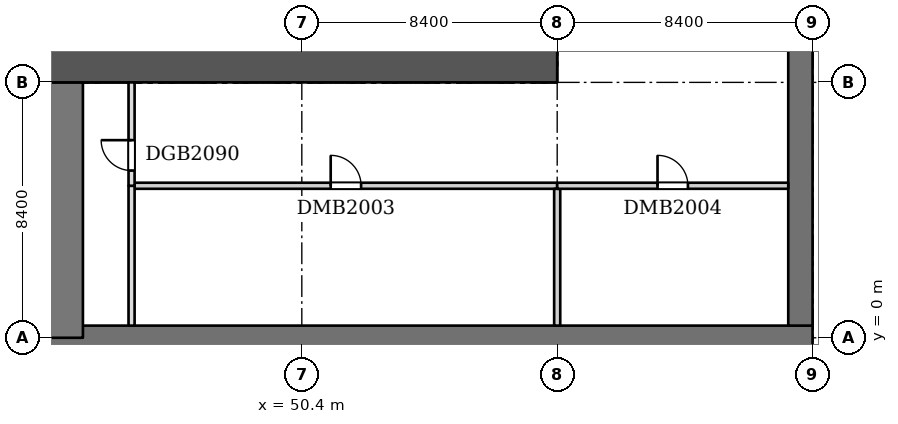
"""IFC4 building model, lengths in metres.
Left out: names, types, materials, properties, quantities, classifications, styles, units other than length and angle.
Written with IfcOpenShell. Run it as: python <this file> out.ifc"""

import sys

from ifc_helpers import new_model, si_unit, direction, frame, frame_2d, origin, place, context, subcontext, project, spatial, rectangle, extrude, element, fill, save


model = new_model("IFC4")
c1 = context("Model", 3, precision=1e-05, world=origin(), true_north=direction((0.0, 1.0)))
c2 = subcontext(c1, "Body", "Model", "MODEL_VIEW")
j1 = project(units=[si_unit("LENGTHUNIT", "METRE"), si_unit("PLANEANGLEUNIT", "RADIAN")], contexts=[c1])
p1 = place(None, origin())
s1 = spatial("IfcSite", under=j1, at=p1, CompositionType="ELEMENT")
p2 = place(p1, origin())
s2 = spatial("IfcBuilding", under=s1, at=p2, CompositionType="ELEMENT")
p3 = place(p2, frame((0.0, 0.0, -8.0)))
s3 = spatial("IfcBuildingStorey", under=s2, at=p3, CompositionType="ELEMENT", Elevation=-8.0)
p4 = place(p3, frame((-8.8, 0.0, 0.0), z_axis=(0.0, 0.0, 1.0), x_axis=(1.0, 0.0, 0.0)))
e1 = element("IfcWall", 1, at=p4, inside=s3, PredefinedType="SOLIDWALL", context=c2, shape_type="SweptSolid", body=[
    extrude(rectangle(XDim=76.0, YDim=0.8, at=frame_2d((38.0, 0.0))), origin(), (0.0, 0.0, 1.0), 3.7),
])
p5 = place(p3, frame((66.8, 0.4, 0.0), z_axis=(0.0, 0.0, 1.0), x_axis=(0.0, 1.0, 0.0)))
e2 = element("IfcWall", 2, at=p5, inside=s3, PredefinedType="SOLIDWALL", context=c2, shape_type="SweptSolid", body=[
    extrude(rectangle(XDim=36.2, YDim=0.8, at=frame_2d((18.1, 0.0))), origin(), (0.0, 0.0, 1.0), 3.7),
])
p6 = place(p3, frame((42.6, 0.0, 0.0), z_axis=(0.0, 0.0, 1.0), x_axis=(0.0, 1.0, 0.0)))
e3 = element("IfcWall", 3, at=p6, inside=s3, PredefinedType="SHEAR", context=c2, shape_type="SweptSolid", body=[
    extrude(rectangle(XDim=8.4, YDim=1.2, at=frame_2d((4.2, 0.0))), origin(), (0.0, 0.0, 1.0), 3.7),
])
p7 = place(p3, frame((42.0, 9.0, 0.0), z_axis=(0.0, 0.0, 1.0), x_axis=(1.0, 0.0, 0.0)))
e4 = element("IfcWall", 4, at=p7, inside=s3, PredefinedType="SHEAR", context=c2, shape_type="SweptSolid", body=[
    extrude(rectangle(XDim=16.8, YDim=1.2, at=frame_2d((8.4, 0.0))), origin(), (0.0, 0.0, 1.0), 3.7),
])
p8 = place(p3, frame((44.9, 5.0, 0.0), z_axis=(0.0, 0.0, 1.0), x_axis=(1.0, 0.0, 0.0)))
e5 = element("IfcWall", 5, at=p8, inside=s3, PredefinedType="PARTITIONING", context=c2, shape_type="SweptSolid", body=[
    extrude(rectangle(XDim=13.9, YDim=0.2, at=frame_2d((6.95, 0.0))), origin(), (0.0, 0.0, 1.0), 3.7),
])
p9 = place(p8, frame((6.45, 0.0, 0.0)))
e6 = element("IfcOpeningElement", 6, at=p9, cuts=e5, PredefinedType="OPENING", context=c2, shape_type="SweptSolid", body=[
    extrude(rectangle(XDim=1.0, YDim=2.1, at=frame_2d((0.5, 1.05))), frame((0.0, 0.11, 0.0), z_axis=(0.0, -1.0, 0.0), x_axis=(1.0, 0.0, 0.0)), (0.0, 0.0, 1.0), 0.22),
])
p10 = place(p3, frame((58.8, 0.4, 0.0), z_axis=(0.0, 0.0, 1.0), x_axis=(0.0, 1.0, 0.0)))
e7 = element("IfcWall", 7, at=p10, inside=s3, PredefinedType="PARTITIONING", context=c2, shape_type="SweptSolid", body=[
    extrude(rectangle(XDim=4.5, YDim=0.2, at=frame_2d((2.25, 0.0))), origin(), (0.0, 0.0, 1.0), 3.7),
])
p11 = place(p3, frame((58.8, 5.0, 0.0), z_axis=(0.0, 0.0, 1.0), x_axis=(1.0, 0.0, 0.0)))
e8 = element("IfcWall", 8, at=p11, inside=s3, PredefinedType="PARTITIONING", context=c2, shape_type="SweptSolid", body=[
    extrude(rectangle(XDim=7.6, YDim=0.2, at=frame_2d((3.8, 0.0))), origin(), (0.0, 0.0, 1.0), 3.7),
])
p12 = place(p11, frame((3.3, 0.0, 0.0)))
e9 = element("IfcOpeningElement", 9, at=p12, cuts=e8, PredefinedType="OPENING", context=c2, shape_type="SweptSolid", body=[
    extrude(rectangle(XDim=1.0, YDim=2.1, at=frame_2d((0.5, 1.05))), frame((0.0, 0.11, 0.0), z_axis=(0.0, -1.0, 0.0), x_axis=(1.0, 0.0, 0.0)), (0.0, 0.0, 1.0), 0.22),
])
p13 = place(p3, frame((44.8, 0.4, 0.0), z_axis=(0.0, 0.0, 1.0), x_axis=(0.0, 1.0, 0.0)))
e10 = element("IfcWall", 10, at=p13, inside=s3, PredefinedType="PARTITIONING", context=c2, shape_type="SweptSolid", body=[
    extrude(rectangle(XDim=4.6, YDim=0.2, at=frame_2d((2.3, 0.0))), origin(), (0.0, 0.0, 1.0), 3.7),
])
p14 = place(p3, frame((44.8, 5.0, 0.0), z_axis=(0.0, 0.0, 1.0), x_axis=(0.0, 1.0, 0.0)))
e11 = element("IfcWall", 11, at=p14, inside=s3, PredefinedType="PARTITIONING", context=c2, shape_type="SweptSolid", body=[
    extrude(rectangle(XDim=3.4, YDim=0.2, at=frame_2d((1.7, 0.0))), origin(), (0.0, 0.0, 1.0), 3.7),
])
p15 = place(p14, frame((0.5, 0.0, 0.0)))
e12 = element("IfcOpeningElement", 12, at=p15, cuts=e11, PredefinedType="OPENING", context=c2, shape_type="SweptSolid", body=[
    extrude(rectangle(XDim=1.0, YDim=2.1, at=frame_2d((0.5, 1.05))), frame((0.0, 0.11, 0.0), z_axis=(0.0, -1.0, 0.0), x_axis=(1.0, 0.0, 0.0)), (0.0, 0.0, 1.0), 0.22),
])
p16 = place(p9, origin())
e13 = element("IfcDoor", 13, at=p16, inside=s3, OperationType="SINGLE_SWING_LEFT", PredefinedType="DOOR", context=c2, shape_type="SweptSolid", body=[
    extrude(rectangle(XDim=1.0, YDim=2.1, at=frame_2d((0.5, 1.05))), frame((0.0, 0.025, 0.0), z_axis=(0.0, -1.0, 0.0), x_axis=(1.0, 0.0, 0.0)), (0.0, 0.0, 1.0), 0.05),
])
fill(e6, e13)
p17 = place(p12, origin())
e14 = element("IfcDoor", 14, at=p17, inside=s3, OperationType="SINGLE_SWING_LEFT", PredefinedType="DOOR", context=c2, shape_type="SweptSolid", body=[
    extrude(rectangle(XDim=1.0, YDim=2.1, at=frame_2d((0.5, 1.05))), frame((0.0, 0.025, 0.0), z_axis=(0.0, -1.0, 0.0), x_axis=(1.0, 0.0, 0.0)), (0.0, 0.0, 1.0), 0.05),
])
fill(e9, e14)
p18 = place(p15, origin())
e15 = element("IfcDoor", 15, at=p18, inside=s3, OperationType="SINGLE_SWING_RIGHT", PredefinedType="DOOR", context=c2, shape_type="SweptSolid", body=[
    extrude(rectangle(XDim=1.0, YDim=2.1, at=frame_2d((0.5, 1.05))), frame((0.0, 0.025, 0.0), z_axis=(0.0, -1.0, 0.0), x_axis=(1.0, 0.0, 0.0)), (0.0, 0.0, 1.0), 0.05),
])
fill(e12, e15)
save(model, sys.argv[1])
